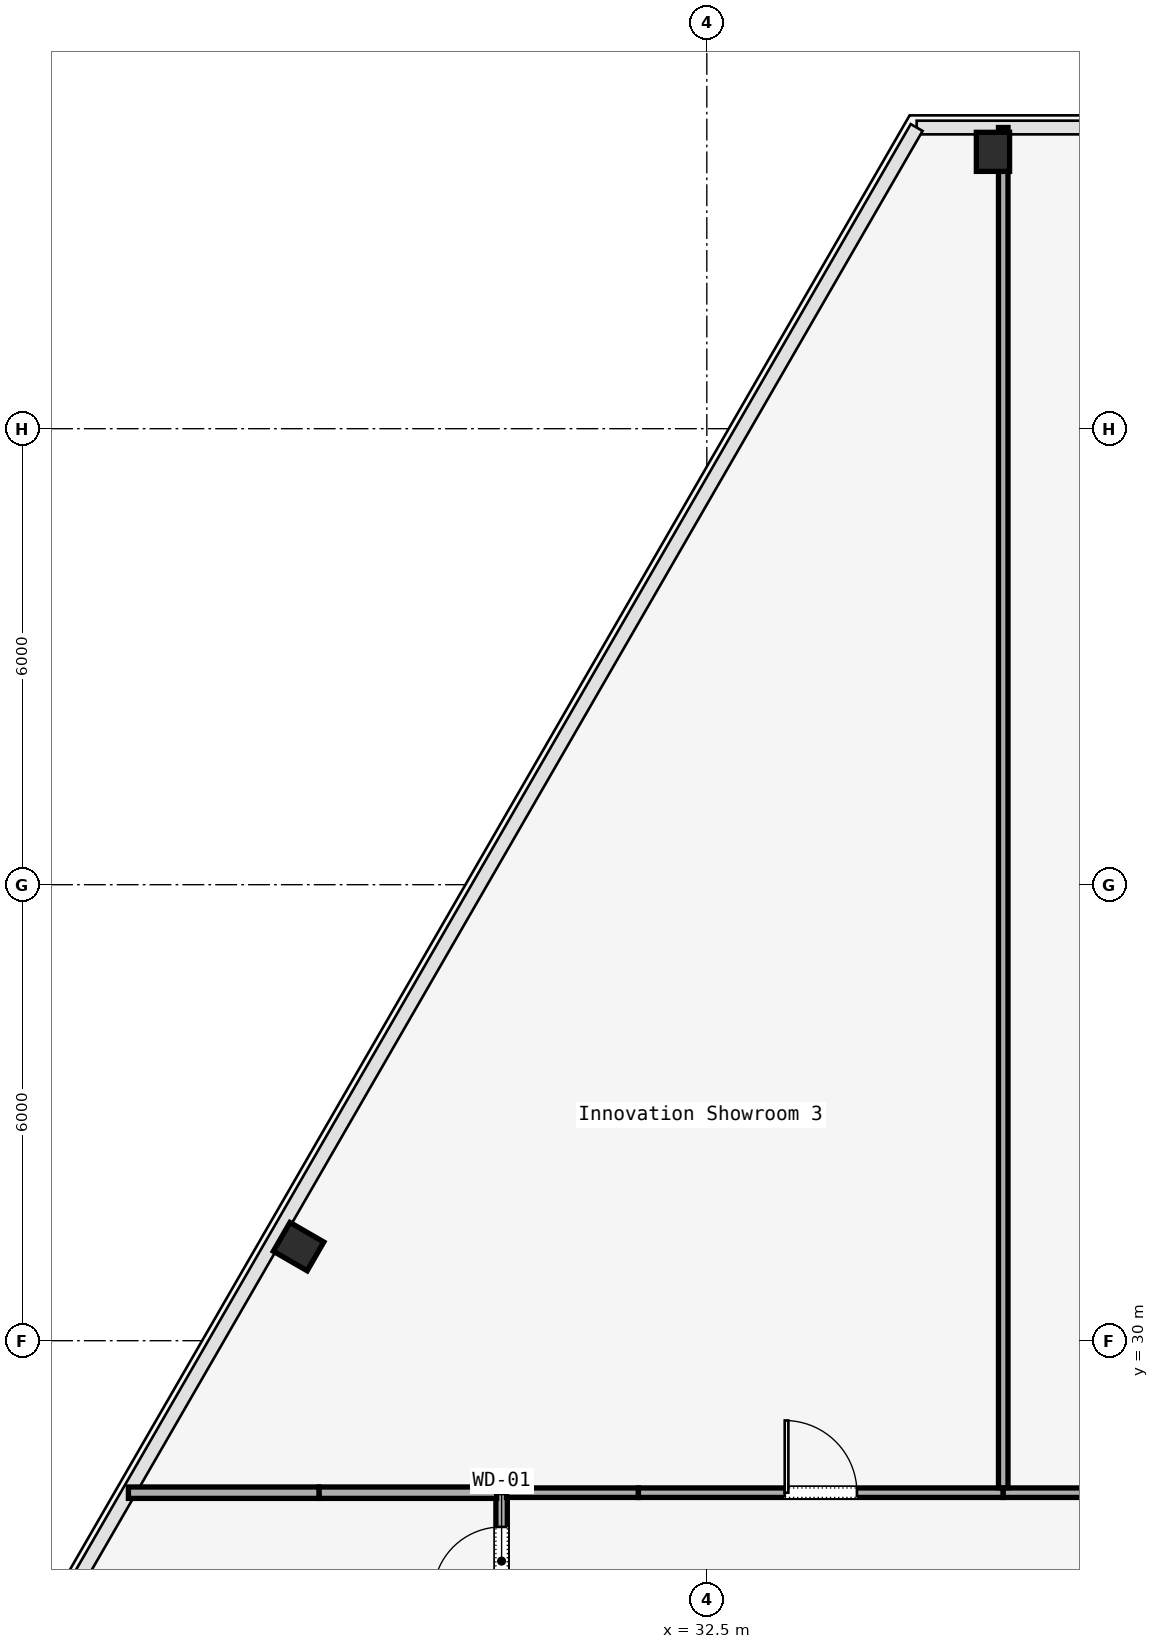
"""IFC4 building model, lengths in metres.
Left out: names, types, materials, properties, quantities, classifications, styles, units other than length and angle.
Written with IfcOpenShell. Run it as: python <this file> out.ifc"""

import sys

from ifc_helpers import new_model, si_unit, direction, frame, frame_2d, origin, origin_2d, place, context, subcontext, project, spatial, rectangle, i_section, extrude, element, fill, save


model = new_model("IFC4")
c1 = context("Model", 3, precision=1e-05, world=origin(), true_north=direction((0.0, 1.0)))
c2 = subcontext(c1, "Body", "Model", "MODEL_VIEW")
j1 = project(units=[si_unit("LENGTHUNIT", "METRE"), si_unit("PLANEANGLEUNIT", "RADIAN")], contexts=[c1])
p1 = place(None, origin())
s1 = spatial("IfcSite", under=j1, at=p1, CompositionType="ELEMENT")
p2 = place(p1, origin())
s2 = spatial("IfcBuilding", under=s1, at=p2, CompositionType="ELEMENT")
p3 = place(p2, frame((0.0, 0.0, 100.6)))
s3 = spatial("IfcBuildingStorey", under=s2, at=p3, CompositionType="ELEMENT", Elevation=100.6)
for number, where, z_axis, x_axis in (
    (1, (36.265, 45.643, 0.0), (0.0, 0.0, 1.0), (1.0, 0.0, 0.0)),
    (2, (27.129, 31.238, 0.0), (0.0, 0.0, 1.0), (0.5, 0.866, 0.0)),
):
    element("IfcColumn", number, at=place(p3, frame(where, z_axis=z_axis, x_axis=x_axis)), inside=s3, PredefinedType="COLUMN", context=c2, shape_type="SweptSolid", body=[
        extrude(i_section(OverallWidth=0.437, OverallDepth=0.514, WebThickness=0.061, FlangeThickness=0.077, FilletRadius=0.015, at=origin_2d()), origin(), (0.0, 0.0, 1.0), 3.58),
    ])
p4 = place(p3, frame((29.8, 26.2, 0.0), z_axis=(0.0, 0.0, 1.0), x_axis=(0.0, 1.0, 0.0)))
e3 = element("IfcWall", 3, at=p4, inside=s3, PredefinedType="PARTITIONING", context=c2, shape_type="SweptSolid", body=[
    extrude(rectangle(XDim=1.8, YDim=0.15, at=frame_2d((0.9, 0.0))), origin(), (0.0, 0.0, 1.0), 2.95),
])
p5 = place(p4, frame((0.45, 0.0, 0.0)))
e4 = element("IfcOpeningElement", 4, at=p5, cuts=e3, PredefinedType="OPENING", context=c2, shape_type="SweptSolid", body=[
    extrude(rectangle(XDim=0.9, YDim=2.15, at=frame_2d((0.45, 1.075))), frame((0.0, 0.075, 0.0), z_axis=(0.0, -1.0, 0.0), x_axis=(1.0, 0.0, 0.0)), (0.0, 0.0, 1.0), 0.15),
])
p6 = place(p3, frame((29.865, 28.0, 0.0), z_axis=(0.0, 0.0, 1.0), x_axis=(1.0, 0.0, 0.0)))
e5 = element("IfcWall", 5, at=p6, inside=s3, PredefinedType="PARTITIONING", context=c2, shape_type="SweptSolid", body=[
    extrude(rectangle(XDim=1.735, YDim=0.125, at=frame_2d((0.868, 0.0))), origin(), (0.0, 0.0, 1.0), 2.95),
])
p7 = place(p3, frame((31.6, 28.0, 0.0), z_axis=(0.0, 0.0, 1.0), x_axis=(1.0, 0.0, 0.0)))
e6 = element("IfcWall", 6, at=p7, inside=s3, PredefinedType="PARTITIONING", context=c2, shape_type="SweptSolid", body=[
    extrude(rectangle(XDim=4.8, YDim=0.125, at=frame_2d((2.4, 0.0))), origin(), (0.0, 0.0, 1.0), 2.95),
])
p8 = place(p7, frame((1.925, 0.0, 0.0)))
e7 = element("IfcOpeningElement", 7, at=p8, cuts=e6, PredefinedType="OPENING", context=c2, shape_type="SweptSolid", body=[
    extrude(rectangle(XDim=0.95, YDim=2.2, at=frame_2d((0.475, 1.1))), frame((0.0, 0.062, 0.0), z_axis=(0.0, -1.0, 0.0), x_axis=(1.0, 0.0, 0.0)), (0.0, 0.0, 1.0), 0.125),
])
p9 = place(p3, frame((36.4, 28.0, 0.0), z_axis=(0.0, 0.0, 1.0), x_axis=(1.0, 0.0, 0.0)))
e8 = element("IfcWall", 8, at=p9, inside=s3, PredefinedType="PARTITIONING", context=c2, shape_type="SweptSolid", body=[
    extrude(rectangle(XDim=5.07, YDim=0.125, at=frame_2d((2.535, 0.0))), origin(), (0.0, 0.0, 1.0), 2.95),
])
p10 = place(p9, frame((2.06, 0.0, 0.0)))
e9 = element("IfcOpeningElement", 9, at=p10, cuts=e8, PredefinedType="OPENING", context=c2, shape_type="SweptSolid", body=[
    extrude(rectangle(XDim=0.95, YDim=2.2, at=frame_2d((0.475, 1.1))), frame((0.0, 0.062, 0.0), z_axis=(0.0, -1.0, 0.0), x_axis=(1.0, 0.0, 0.0)), (0.0, 0.0, 1.0), 0.125),
])
p11 = place(p3, frame((24.89, 28.0, 0.0), z_axis=(0.0, 0.0, 1.0), x_axis=(1.0, 0.0, 0.0)))
e10 = element("IfcWall", 10, at=p11, inside=s3, PredefinedType="PARTITIONING", context=c2, shape_type="SweptSolid", body=[
    extrude(rectangle(XDim=2.51, YDim=0.15, at=frame_2d((1.255, 0.0))), origin(), (0.0, 0.0, 1.0), 2.95),
])
p12 = place(p3, frame((27.4, 28.0, 0.0), z_axis=(0.0, 0.0, 1.0), x_axis=(1.0, 0.0, 0.0)))
e11 = element("IfcWall", 11, at=p12, inside=s3, PredefinedType="PARTITIONING", context=c2, shape_type="SweptSolid", body=[
    extrude(rectangle(XDim=2.335, YDim=0.15, at=frame_2d((1.167, 0.0))), origin(), (0.0, 0.0, 1.0), 2.95),
])
p13 = place(p3, frame((36.4, 45.963, 0.0), z_axis=(0.0, 0.0, 1.0), x_axis=(0.0, -1.0, 0.0)))
e12 = element("IfcWall", 12, at=p13, inside=s3, PredefinedType="PARTITIONING", context=c2, shape_type="SweptSolid", body=[
    extrude(rectangle(XDim=17.898, YDim=0.125, at=frame_2d((8.949, 0.0))), origin(), (0.0, 0.0, 1.0), 2.95),
])
p14 = place(p5, origin())
e13 = element("IfcDoor", 13, at=p14, inside=s3, OperationType="SINGLE_SWING_LEFT", PredefinedType="DOOR", context=c2, shape_type="SweptSolid", body=[
    extrude(rectangle(XDim=0.9, YDim=2.15, at=frame_2d((0.45, 1.075))), frame((0.0, 0.025, 0.0), z_axis=(0.0, -1.0, 0.0), x_axis=(1.0, 0.0, 0.0)), (0.0, 0.0, 1.0), 0.05),
])
fill(e4, e13)
p15 = place(p8, origin())
e14 = element("IfcDoor", 14, at=p15, inside=s3, OperationType="SINGLE_SWING_LEFT", PredefinedType="DOOR", context=c2, shape_type="SweptSolid", body=[
    extrude(rectangle(XDim=0.95, YDim=2.2, at=frame_2d((0.475, 1.1))), frame((0.0, 0.025, 0.0), z_axis=(0.0, -1.0, 0.0), x_axis=(1.0, 0.0, 0.0)), (0.0, 0.0, 1.0), 0.05),
])
fill(e7, e14)
save(model, sys.argv[1])
